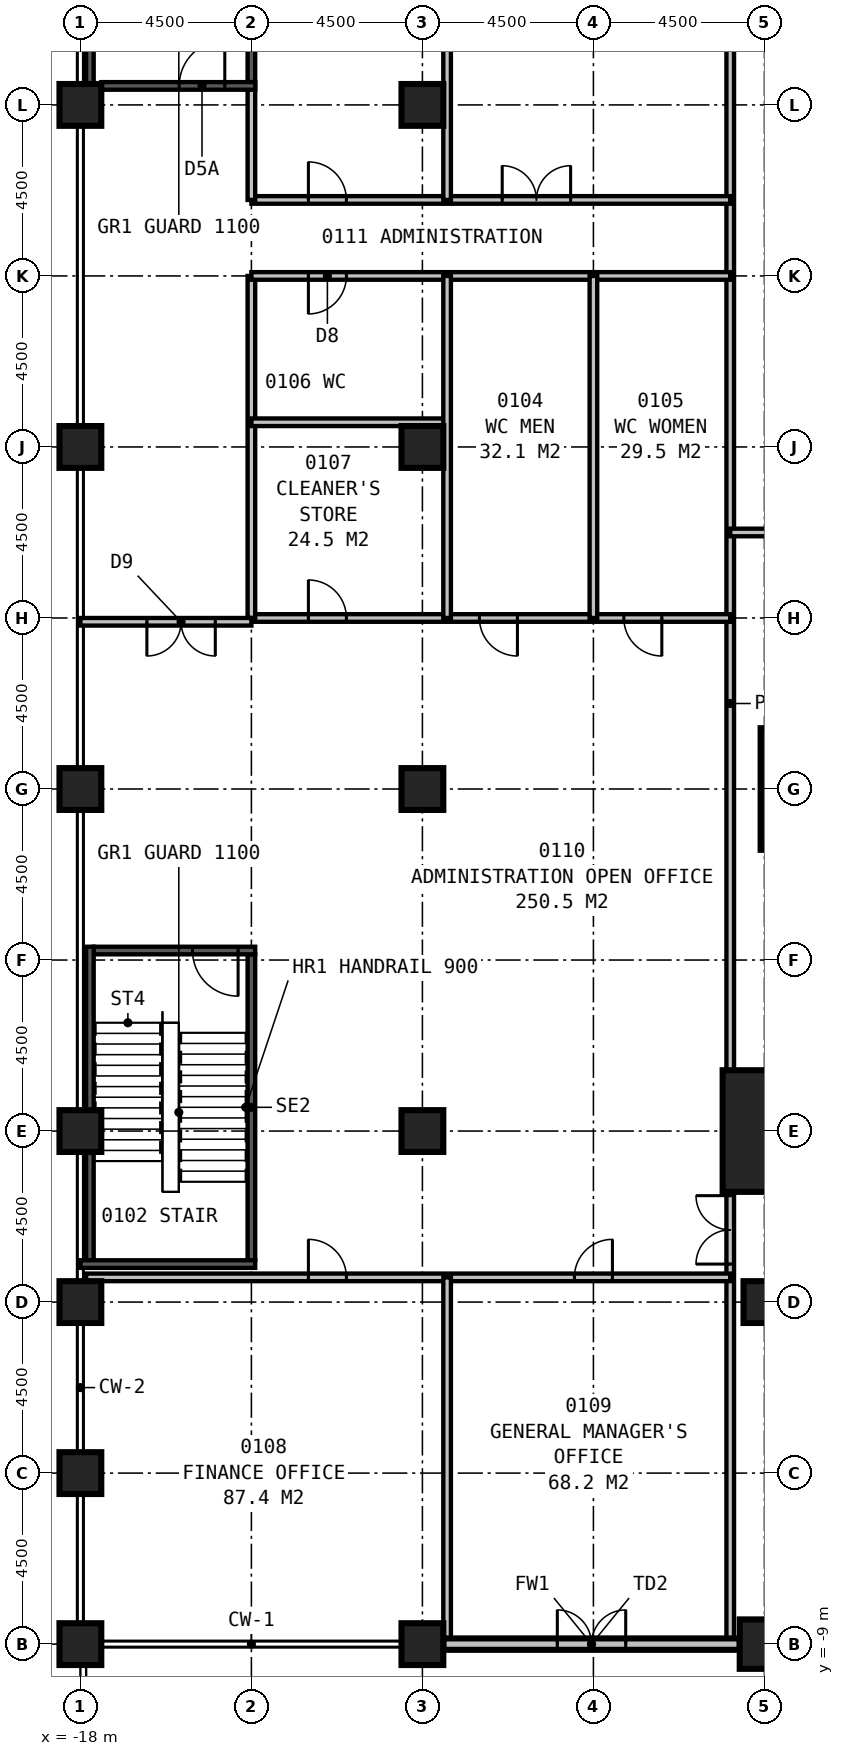
"""IFC4 building model, lengths in metres.
Left out: names, types, materials, properties, quantities, classifications, styles, units other than length and angle.
Written with IfcOpenShell. Run it as: python <this file> out.ifc"""

import sys

from ifc_helpers import new_model, si_unit, direction, frame, frame_2d, origin, origin_2d, place, context, subcontext, project, spatial, rectangle, extrude, element, fill, save


model = new_model("IFC4")
c1 = context("Model", 3, precision=1e-05, world=origin(), true_north=direction((0.0, 1.0)))
c2 = subcontext(c1, "Body", "Model", "MODEL_VIEW")
j1 = project(units=[si_unit("LENGTHUNIT", "METRE"), si_unit("PLANEANGLEUNIT", "RADIAN")], contexts=[c1])
p1 = place(None, origin())
s1 = spatial("IfcSite", under=j1, at=p1, CompositionType="ELEMENT")
p2 = place(p1, origin())
s2 = spatial("IfcBuilding", under=s1, at=p2, CompositionType="ELEMENT")
p3 = place(p2, frame((0.0, 0.0, 6.0)))
s3 = spatial("IfcBuildingStorey", under=s2, at=p3, CompositionType="ELEMENT", Elevation=6.0)
for number, where, z_axis, x_axis in (
    (1, (0.5, 4.5, 0.0), (0.0, 0.0, 1.0), (1.0, 0.0, 0.0)),
    (2, (1.5, 13.5, 0.0), (0.0, 0.0, 1.0), (1.0, 0.0, 0.0)),
):
    element("IfcColumn", number, at=place(p3, frame(where, z_axis=z_axis, x_axis=x_axis)), inside=s3, PredefinedType="COLUMN", context=c2, shape_type="SweptSolid", body=[
        extrude(rectangle(XDim=3.2, YDim=3.2, at=origin_2d()), origin(), (0.0, 0.0, 1.0), 5.0),
    ])
for number, where, z_axis, x_axis in (
    (3, (-18.0, -4.5, 0.0), (0.0, 0.0, 1.0), (1.0, 0.0, 0.0)),
    (4, (-18.0, 4.5, 0.0), (0.0, 0.0, 1.0), (1.0, 0.0, 0.0)),
    (5, (-9.0, 4.5, 0.0), (0.0, 0.0, 1.0), (1.0, 0.0, 0.0)),
    (6, (-18.0, 13.5, 0.0), (0.0, 0.0, 1.0), (1.0, 0.0, 0.0)),
    (7, (-9.0, 13.5, 0.0), (0.0, 0.0, 1.0), (1.0, 0.0, 0.0)),
    (8, (-18.0, 22.5, 0.0), (0.0, 0.0, 1.0), (1.0, 0.0, 0.0)),
    (9, (-9.0, 22.5, 0.0), (0.0, 0.0, 1.0), (1.0, 0.0, 0.0)),
    (10, (-18.0, 31.5, 0.0), (0.0, 0.0, 1.0), (1.0, 0.0, 0.0)),
    (11, (-9.0, 31.5, 0.0), (0.0, 0.0, 1.0), (1.0, 0.0, 0.0)),
    (12, (-18.0, 0.0, 0.0), (0.0, 0.0, 1.0), (1.0, 0.0, 0.0)),
):
    element("IfcColumn", number, at=place(p3, frame(where, z_axis=z_axis, x_axis=x_axis)), inside=s3, PredefinedType="COLUMN", context=c2, shape_type="SweptSolid", body=[
        extrude(rectangle(XDim=1.1, YDim=1.1, at=origin_2d()), origin(), (0.0, 0.0, 1.0), 5.0),
    ])
p4 = place(p3, frame((0.0, -9.0, 0.0), z_axis=(0.0, 0.0, 1.0), x_axis=(1.0, 0.0, 0.0)))
e13 = element("IfcColumn", 13, at=p4, inside=s3, PredefinedType="COLUMN", context=c2, shape_type="SweptSolid", body=[
    extrude(rectangle(XDim=1.3, YDim=1.3, at=origin_2d()), origin(), (0.0, 0.0, 1.0), 5.0),
])
for number, where, z_axis, x_axis in (
    (14, (-18.0, -9.0, 0.0), (0.0, 0.0, 1.0), (1.0, 0.0, 0.0)),
    (15, (-9.0, -9.0, 0.0), (0.0, 0.0, 1.0), (1.0, 0.0, 0.0)),
    (16, (0.0, 0.0, 0.0), (0.0, 0.0, 1.0), (1.0, 0.0, 0.0)),
):
    element("IfcColumn", number, at=place(p3, frame(where, z_axis=z_axis, x_axis=x_axis)), inside=s3, PredefinedType="COLUMN", context=c2, shape_type="SweptSolid", body=[
        extrude(rectangle(XDim=1.1, YDim=1.1, at=origin_2d()), origin(), (0.0, 0.0, 1.0), 5.0),
    ])
p5 = place(p3, frame((-8.45, -9.0, 0.0), z_axis=(0.0, 0.0, 1.0), x_axis=(1.0, 0.0, 0.0)))
e17 = element("IfcWall", 17, at=p5, inside=s3, PredefinedType="STANDARD", context=c2, shape_type="SweptSolid", body=[
    extrude(rectangle(XDim=7.8, YDim=0.3, at=frame_2d((3.9, 0.0))), origin(), (0.0, 0.0, 1.0), 3.1),
])
p6 = place(p5, frame((3.0, 0.0, 0.0)))
e18 = element("IfcOpeningElement", 18, at=p6, cuts=e17, PredefinedType="OPENING", context=c2, shape_type="SweptSolid", body=[
    extrude(rectangle(XDim=1.8, YDim=2.4, at=frame_2d((0.9, 1.2))), frame((0.0, 0.16, 0.0), z_axis=(0.0, -1.0, 0.0), x_axis=(1.0, 0.0, 0.0)), (0.0, 0.0, 1.0), 0.32),
])
p7 = place(p3, frame((-17.45, 32.0, 0.0), z_axis=(0.0, 0.0, 1.0), x_axis=(1.0, 0.0, 0.0)))
e19 = element("IfcWall", 19, at=p7, inside=s3, PredefinedType="SOLIDWALL", context=c2, shape_type="SweptSolid", body=[
    extrude(rectangle(XDim=4.05, YDim=0.2, at=frame_2d((2.025, 0.0))), origin(), (0.0, 0.0, 1.0), 3.1),
])
p8 = place(p7, frame((2.05, 0.0, 0.0)))
e20 = element("IfcOpeningElement", 20, at=p8, cuts=e19, PredefinedType="OPENING", context=c2, shape_type="SweptSolid", body=[
    extrude(rectangle(XDim=1.2, YDim=2.1, at=frame_2d((0.6, 1.05))), frame((0.0, 0.11, 0.0), z_axis=(0.0, -1.0, 0.0), x_axis=(1.0, 0.0, 0.0)), (0.0, 0.0, 1.0), 0.22),
])
p9 = place(p3, frame((-13.5, 32.1, 0.0), z_axis=(0.0, 0.0, 1.0), x_axis=(0.0, 1.0, 0.0)))
e21 = element("IfcWall", 21, at=p9, inside=s3, PredefinedType="SOLIDWALL", context=c2, shape_type="SweptSolid", body=[
    extrude(rectangle(XDim=8.4, YDim=0.2, at=frame_2d((4.2, 0.0))), origin(), (0.0, 0.0, 1.0), 4.7),
])
p10 = place(p3, frame((-17.65, 9.25, 0.0), z_axis=(0.0, 0.0, 1.0), x_axis=(1.0, 0.0, 0.0)))
e22 = element("IfcWall", 22, at=p10, inside=s3, PredefinedType="SOLIDWALL", context=c2, shape_type="SweptSolid", body=[
    extrude(rectangle(XDim=4.25, YDim=0.2, at=frame_2d((2.125, 0.0))), origin(), (0.0, 0.0, 1.0), 4.7),
])
p11 = place(p10, frame((3.8, 0.0, 0.0), z_axis=(0.0, 0.0, 1.0), x_axis=(-1.0, 0.0, 0.0)))
e23 = element("IfcOpeningElement", 23, at=p11, cuts=e22, PredefinedType="OPENING", context=c2, shape_type="SweptSolid", body=[
    extrude(rectangle(XDim=1.2, YDim=2.1, at=frame_2d((0.6, 1.05))), frame((0.0, 0.11, 0.0), z_axis=(0.0, -1.0, 0.0), x_axis=(1.0, 0.0, 0.0)), (0.0, 0.0, 1.0), 0.22),
])
p12 = place(p3, frame((-18.0, 1.0, 0.0), z_axis=(0.0, 0.0, 1.0), x_axis=(1.0, 0.0, 0.0)))
e24 = element("IfcWall", 24, at=p12, inside=s3, PredefinedType="SOLIDWALL", context=c2, shape_type="SweptSolid", body=[
    extrude(rectangle(XDim=4.6, YDim=0.2, at=frame_2d((2.3, 0.0))), origin(), (0.0, 0.0, 1.0), 4.7),
])
p13 = place(p3, frame((-13.5, 1.1, 0.0), z_axis=(0.0, 0.0, 1.0), x_axis=(0.0, 1.0, 0.0)))
e25 = element("IfcWall", 25, at=p13, inside=s3, PredefinedType="SOLIDWALL", context=c2, shape_type="SweptSolid", body=[
    extrude(rectangle(XDim=8.05, YDim=0.2, at=frame_2d((4.025, 0.0))), origin(), (0.0, 0.0, 1.0), 4.7),
])
p14 = place(p3, frame((-17.75, 32.05, 0.0), z_axis=(0.0, 0.0, 1.0), x_axis=(0.0, 1.0, 0.0)))
e26 = element("IfcWall", 26, at=p14, inside=s3, PredefinedType="SOLIDWALL", context=c2, shape_type="SweptSolid", body=[
    extrude(rectangle(XDim=7.9, YDim=0.2, at=frame_2d((3.95, 0.0))), origin(), (0.0, 0.0, 1.0), 4.7),
])
p15 = place(p3, frame((-17.75, 1.1, 0.0), z_axis=(0.0, 0.0, 1.0), x_axis=(0.0, 1.0, 0.0)))
e27 = element("IfcWall", 27, at=p15, inside=s3, PredefinedType="SOLIDWALL", context=c2, shape_type="SweptSolid", body=[
    extrude(rectangle(XDim=2.85, YDim=0.2, at=frame_2d((1.425, 0.0))), origin(), (0.0, 0.0, 1.0), 4.7),
])
p16 = place(p3, frame((-17.75, 5.05, 0.0), z_axis=(0.0, 0.0, 1.0), x_axis=(0.0, 1.0, 0.0)))
e28 = element("IfcWall", 28, at=p16, inside=s3, PredefinedType="SOLIDWALL", context=c2, shape_type="SweptSolid", body=[
    extrude(rectangle(XDim=4.3, YDim=0.2, at=frame_2d((2.15, 0.0))), origin(), (0.0, 0.0, 1.0), 4.7),
])
p17 = place(p3, frame((-0.9, -9.0, 0.0), z_axis=(0.0, 0.0, 1.0), x_axis=(0.0, 1.0, 0.0)))
e29 = element("IfcWall", 29, at=p17, inside=s3, PredefinedType="PARTITIONING", context=c2, shape_type="SweptSolid", body=[
    extrude(rectangle(XDim=49.5, YDim=0.2, at=frame_2d((24.75, 0.0))), origin(), (0.0, 0.0, 1.0), 4.7),
])
p18 = place(p17, frame((10.0, 0.0, 0.0)))
e30 = element("IfcOpeningElement", 30, at=p18, cuts=e29, PredefinedType="OPENING", context=c2, shape_type="SweptSolid", body=[
    extrude(rectangle(XDim=1.8, YDim=2.4, at=frame_2d((0.9, 1.2))), frame((0.0, 0.11, 0.0), z_axis=(0.0, -1.0, 0.0), x_axis=(1.0, 0.0, 0.0)), (0.0, 0.0, 1.0), 0.22),
])
p19 = place(p3, frame((-13.5, 18.0, 0.0), z_axis=(0.0, 0.0, 1.0), x_axis=(1.0, 0.0, 0.0)))
e31 = element("IfcWall", 31, at=p19, inside=s3, PredefinedType="PARTITIONING", context=c2, shape_type="SweptSolid", body=[
    extrude(rectangle(XDim=12.6, YDim=0.2, at=frame_2d((6.3, 0.0))), origin(), (0.0, 0.0, 1.0), 4.7),
])
p20 = place(p19, frame((7.0, 0.0, 0.0), z_axis=(0.0, 0.0, 1.0), x_axis=(-1.0, 0.0, 0.0)))
e32 = element("IfcOpeningElement", 32, at=p20, cuts=e31, PredefinedType="OPENING", context=c2, shape_type="SweptSolid", body=[
    extrude(rectangle(XDim=1.0, YDim=2.1, at=frame_2d((0.5, 1.05))), frame((0.0, 0.11, 0.0), z_axis=(0.0, -1.0, 0.0), x_axis=(1.0, 0.0, 0.0)), (0.0, 0.0, 1.0), 0.22),
])
p21 = place(p19, frame((10.8, 0.0, 0.0), z_axis=(0.0, 0.0, 1.0), x_axis=(-1.0, 0.0, 0.0)))
e33 = element("IfcOpeningElement", 33, at=p21, cuts=e31, PredefinedType="OPENING", context=c2, shape_type="SweptSolid", body=[
    extrude(rectangle(XDim=1.0, YDim=2.1, at=frame_2d((0.5, 1.05))), frame((0.0, 0.11, 0.0), z_axis=(0.0, -1.0, 0.0), x_axis=(1.0, 0.0, 0.0)), (0.0, 0.0, 1.0), 0.22),
])
p22 = place(p19, frame((1.5, 0.0, 0.0)))
e34 = element("IfcOpeningElement", 34, at=p22, cuts=e31, PredefinedType="OPENING", context=c2, shape_type="SweptSolid", body=[
    extrude(rectangle(XDim=1.0, YDim=2.1, at=frame_2d((0.5, 1.05))), frame((0.0, 0.11, 0.0), z_axis=(0.0, -1.0, 0.0), x_axis=(1.0, 0.0, 0.0)), (0.0, 0.0, 1.0), 0.22),
])
p23 = place(p3, frame((-13.5, 18.0, 0.0), z_axis=(0.0, 0.0, 1.0), x_axis=(0.0, 1.0, 0.0)))
e35 = element("IfcWall", 35, at=p23, inside=s3, PredefinedType="PARTITIONING", context=c2, shape_type="SweptSolid", body=[
    extrude(rectangle(XDim=9.0, YDim=0.2, at=frame_2d((4.5, 0.0))), origin(), (0.0, 0.0, 1.0), 4.7),
])
p24 = place(p3, frame((-13.5, 27.0, 0.0), z_axis=(0.0, 0.0, 1.0), x_axis=(1.0, 0.0, 0.0)))
e36 = element("IfcWall", 36, at=p24, inside=s3, PredefinedType="PARTITIONING", context=c2, shape_type="SweptSolid", body=[
    extrude(rectangle(XDim=12.6, YDim=0.2, at=frame_2d((6.3, 0.0))), origin(), (0.0, 0.0, 1.0), 4.7),
])
p25 = place(p24, frame((2.5, 0.0, 0.0), z_axis=(0.0, 0.0, 1.0), x_axis=(-1.0, 0.0, 0.0)))
e37 = element("IfcOpeningElement", 37, at=p25, cuts=e36, PredefinedType="OPENING", context=c2, shape_type="SweptSolid", body=[
    extrude(rectangle(XDim=1.0, YDim=2.1, at=frame_2d((0.5, 1.05))), frame((0.0, 0.11, 0.0), z_axis=(0.0, -1.0, 0.0), x_axis=(1.0, 0.0, 0.0)), (0.0, 0.0, 1.0), 0.22),
])
p26 = place(p3, frame((-4.5, 18.0, 0.0), z_axis=(0.0, 0.0, 1.0), x_axis=(0.0, 1.0, 0.0)))
e38 = element("IfcWall", 38, at=p26, inside=s3, PredefinedType="PARTITIONING", context=c2, shape_type="SweptSolid", body=[
    extrude(rectangle(XDim=9.0, YDim=0.2, at=frame_2d((4.5, 0.0))), origin(), (0.0, 0.0, 1.0), 4.7),
])
p27 = place(p3, frame((-13.5, 23.15, 0.0), z_axis=(0.0, 0.0, 1.0), x_axis=(1.0, 0.0, 0.0)))
e39 = element("IfcWall", 39, at=p27, inside=s3, PredefinedType="PARTITIONING", context=c2, shape_type="SweptSolid", body=[
    extrude(rectangle(XDim=5.15, YDim=0.2, at=frame_2d((2.575, 0.0))), origin(), (0.0, 0.0, 1.0), 4.7),
])
p28 = place(p3, frame((-8.35, 18.0, 0.0), z_axis=(0.0, 0.0, 1.0), x_axis=(0.0, 1.0, 0.0)))
e40 = element("IfcWall", 40, at=p28, inside=s3, PredefinedType="PARTITIONING", context=c2, shape_type="SweptSolid", body=[
    extrude(rectangle(XDim=9.0, YDim=0.2, at=frame_2d((4.5, 0.0))), origin(), (0.0, 0.0, 1.0), 4.7),
])
p29 = place(p3, frame((-17.85, 0.65, 0.0), z_axis=(0.0, 0.0, 1.0), x_axis=(1.0, 0.0, 0.0)))
e41 = element("IfcWall", 41, at=p29, inside=s3, PredefinedType="PARTITIONING", context=c2, shape_type="SweptSolid", body=[
    extrude(rectangle(XDim=16.95, YDim=0.2, at=frame_2d((8.475, 0.0))), origin(), (0.0, 0.0, 1.0), 4.7),
])
p30 = place(p29, frame((5.85, 0.0, 0.0)))
e42 = element("IfcOpeningElement", 42, at=p30, cuts=e41, PredefinedType="OPENING", context=c2, shape_type="SweptSolid", body=[
    extrude(rectangle(XDim=1.0, YDim=2.1, at=frame_2d((0.5, 1.05))), frame((0.0, 0.11, 0.0), z_axis=(0.0, -1.0, 0.0), x_axis=(1.0, 0.0, 0.0)), (0.0, 0.0, 1.0), 0.22),
])
p31 = place(p29, frame((12.85, 0.0, 0.0)))
e43 = element("IfcOpeningElement", 43, at=p31, cuts=e41, PredefinedType="OPENING", context=c2, shape_type="SweptSolid", body=[
    extrude(rectangle(XDim=1.0, YDim=2.1, at=frame_2d((0.5, 1.05))), frame((0.0, 0.11, 0.0), z_axis=(0.0, -1.0, 0.0), x_axis=(1.0, 0.0, 0.0)), (0.0, 0.0, 1.0), 0.22),
])
p32 = place(p3, frame((-8.35, -8.85, 0.0), z_axis=(0.0, 0.0, 1.0), x_axis=(0.0, 1.0, 0.0)))
e44 = element("IfcWall", 44, at=p32, inside=s3, PredefinedType="PARTITIONING", context=c2, shape_type="SweptSolid", body=[
    extrude(rectangle(XDim=9.5, YDim=0.2, at=frame_2d((4.75, 0.0))), origin(), (0.0, 0.0, 1.0), 2.8),
])
p33 = place(p3, frame((-18.0, 17.9, 0.0), z_axis=(0.0, 0.0, 1.0), x_axis=(1.0, 0.0, 0.0)))
e45 = element("IfcWall", 45, at=p33, inside=s3, PredefinedType="PARTITIONING", context=c2, shape_type="SweptSolid", body=[
    extrude(rectangle(XDim=4.5, YDim=0.2, at=frame_2d((2.25, 0.0))), origin(), (0.0, 0.0, 1.0), 4.7),
])
p34 = place(p33, frame((3.55, 0.0, 0.0), z_axis=(0.0, 0.0, 1.0), x_axis=(-1.0, 0.0, 0.0)))
e46 = element("IfcOpeningElement", 46, at=p34, cuts=e45, PredefinedType="OPENING", context=c2, shape_type="SweptSolid", body=[
    extrude(rectangle(XDim=1.8, YDim=2.4, at=frame_2d((0.9, 1.2))), frame((0.0, 0.11, 0.0), z_axis=(0.0, -1.0, 0.0), x_axis=(1.0, 0.0, 0.0)), (0.0, 0.0, 1.0), 0.22),
])
p35 = place(p3, frame((-13.5, 29.0, 0.0), z_axis=(0.0, 0.0, 1.0), x_axis=(1.0, 0.0, 0.0)))
e47 = element("IfcWall", 47, at=p35, inside=s3, PredefinedType="PARTITIONING", context=c2, shape_type="SweptSolid", body=[
    extrude(rectangle(XDim=12.6, YDim=0.2, at=frame_2d((6.3, 0.0))), origin(), (0.0, 0.0, 1.0), 4.7),
])
p36 = place(p35, frame((1.5, 0.0, 0.0)))
e48 = element("IfcOpeningElement", 48, at=p36, cuts=e47, PredefinedType="OPENING", context=c2, shape_type="SweptSolid", body=[
    extrude(rectangle(XDim=1.0, YDim=2.1, at=frame_2d((0.5, 1.05))), frame((0.0, 0.11, 0.0), z_axis=(0.0, -1.0, 0.0), x_axis=(1.0, 0.0, 0.0)), (0.0, 0.0, 1.0), 0.22),
])
p37 = place(p35, frame((6.6, 0.0, 0.0)))
e49 = element("IfcOpeningElement", 49, at=p37, cuts=e47, PredefinedType="OPENING", context=c2, shape_type="SweptSolid", body=[
    extrude(rectangle(XDim=1.8, YDim=2.4, at=frame_2d((0.9, 1.2))), frame((0.0, 0.11, 0.0), z_axis=(0.0, -1.0, 0.0), x_axis=(1.0, 0.0, 0.0)), (0.0, 0.0, 1.0), 0.22),
])
p38 = place(p3, frame((-13.5, 29.0, 0.0), z_axis=(0.0, 0.0, 1.0), x_axis=(0.0, 1.0, 0.0)))
e50 = element("IfcWall", 50, at=p38, inside=s3, PredefinedType="PARTITIONING", context=c2, shape_type="SweptSolid", body=[
    extrude(rectangle(XDim=3.0, YDim=0.2, at=frame_2d((1.5, 0.0))), origin(), (0.0, 0.0, 1.0), 4.7),
])
p39 = place(p3, frame((-8.35, 29.0, 0.0), z_axis=(0.0, 0.0, 1.0), x_axis=(0.0, 1.0, 0.0)))
e51 = element("IfcWall", 51, at=p39, inside=s3, PredefinedType="PARTITIONING", context=c2, shape_type="SweptSolid", body=[
    extrude(rectangle(XDim=11.35, YDim=0.2, at=frame_2d((5.675, 0.0))), origin(), (0.0, 0.0, 1.0), 4.7),
])
p40 = place(p3, frame((-0.9, 20.25, 0.0), z_axis=(0.0, 0.0, 1.0), x_axis=(1.0, 0.0, 0.0)))
e52 = element("IfcWall", 52, at=p40, inside=s3, PredefinedType="PARTITIONING", context=c2, shape_type="SweptSolid", body=[
    extrude(rectangle(XDim=14.1, YDim=0.2, at=frame_2d((7.05, 0.0))), origin(), (0.0, 0.0, 1.0), 4.7),
])
p41 = place(p40, frame((5.0, 0.0, 0.0)))
e53 = element("IfcOpeningElement", 53, at=p41, cuts=e52, PredefinedType="OPENING", context=c2, shape_type="SweptSolid", body=[
    extrude(rectangle(XDim=1.8, YDim=2.4, at=frame_2d((0.9, 1.2))), frame((0.0, 0.11, 0.0), z_axis=(0.0, -1.0, 0.0), x_axis=(1.0, 0.0, 0.0)), (0.0, 0.0, 1.0), 0.22),
])
p42 = place(p6, origin())
e54 = element("IfcDoor", 54, at=p42, inside=s3, OperationType="DOUBLE_DOOR_SINGLE_SWING", PredefinedType="DOOR", context=c2, shape_type="SweptSolid", body=[
    extrude(rectangle(XDim=1.8, YDim=2.4, at=frame_2d((0.9, 1.2))), frame((0.0, 0.025, 0.0), z_axis=(0.0, -1.0, 0.0), x_axis=(1.0, 0.0, 0.0)), (0.0, 0.0, 1.0), 0.05),
])
fill(e18, e54)
p43 = place(p8, origin())
e55 = element("IfcDoor", 55, at=p43, inside=s3, OperationType="SINGLE_SWING_RIGHT", PredefinedType="DOOR", context=c2, shape_type="SweptSolid", body=[
    extrude(rectangle(XDim=1.2, YDim=2.1, at=frame_2d((0.6, 1.05))), frame((0.0, 0.025, 0.0), z_axis=(0.0, -1.0, 0.0), x_axis=(1.0, 0.0, 0.0)), (0.0, 0.0, 1.0), 0.05),
])
fill(e20, e55)
p44 = place(p11, origin())
e56 = element("IfcDoor", 56, at=p44, inside=s3, OperationType="SINGLE_SWING_LEFT", PredefinedType="DOOR", context=c2, shape_type="SweptSolid", body=[
    extrude(rectangle(XDim=1.2, YDim=2.1, at=frame_2d((0.6, 1.05))), frame((0.0, 0.025, 0.0), z_axis=(0.0, -1.0, 0.0), x_axis=(1.0, 0.0, 0.0)), (0.0, 0.0, 1.0), 0.05),
])
fill(e23, e56)
p45 = place(p18, origin())
e57 = element("IfcDoor", 57, at=p45, inside=s3, OperationType="DOUBLE_DOOR_SINGLE_SWING", PredefinedType="DOOR", context=c2, shape_type="SweptSolid", body=[
    extrude(rectangle(XDim=1.8, YDim=2.4, at=frame_2d((0.9, 1.2))), frame((0.0, 0.025, 0.0), z_axis=(0.0, -1.0, 0.0), x_axis=(1.0, 0.0, 0.0)), (0.0, 0.0, 1.0), 0.05),
])
fill(e30, e57)
p46 = place(p20, origin())
e58 = element("IfcDoor", 58, at=p46, inside=s3, OperationType="SINGLE_SWING_LEFT", PredefinedType="DOOR", context=c2, shape_type="SweptSolid", body=[
    extrude(rectangle(XDim=1.0, YDim=2.1, at=frame_2d((0.5, 1.05))), frame((0.0, 0.025, 0.0), z_axis=(0.0, -1.0, 0.0), x_axis=(1.0, 0.0, 0.0)), (0.0, 0.0, 1.0), 0.05),
])
fill(e32, e58)
p47 = place(p21, origin())
e59 = element("IfcDoor", 59, at=p47, inside=s3, OperationType="SINGLE_SWING_LEFT", PredefinedType="DOOR", context=c2, shape_type="SweptSolid", body=[
    extrude(rectangle(XDim=1.0, YDim=2.1, at=frame_2d((0.5, 1.05))), frame((0.0, 0.025, 0.0), z_axis=(0.0, -1.0, 0.0), x_axis=(1.0, 0.0, 0.0)), (0.0, 0.0, 1.0), 0.05),
])
fill(e33, e59)
p48 = place(p22, origin())
e60 = element("IfcDoor", 60, at=p48, inside=s3, OperationType="SINGLE_SWING_LEFT", PredefinedType="DOOR", context=c2, shape_type="SweptSolid", body=[
    extrude(rectangle(XDim=1.0, YDim=2.1, at=frame_2d((0.5, 1.05))), frame((0.0, 0.025, 0.0), z_axis=(0.0, -1.0, 0.0), x_axis=(1.0, 0.0, 0.0)), (0.0, 0.0, 1.0), 0.05),
])
fill(e34, e60)
p49 = place(p25, origin())
e61 = element("IfcDoor", 61, at=p49, inside=s3, OperationType="SINGLE_SWING_RIGHT", PredefinedType="DOOR", context=c2, shape_type="SweptSolid", body=[
    extrude(rectangle(XDim=1.0, YDim=2.1, at=frame_2d((0.5, 1.05))), frame((0.0, 0.025, 0.0), z_axis=(0.0, -1.0, 0.0), x_axis=(1.0, 0.0, 0.0)), (0.0, 0.0, 1.0), 0.05),
])
fill(e37, e61)
p50 = place(p30, origin())
e62 = element("IfcDoor", 62, at=p50, inside=s3, OperationType="SINGLE_SWING_LEFT", PredefinedType="DOOR", context=c2, shape_type="SweptSolid", body=[
    extrude(rectangle(XDim=1.0, YDim=2.1, at=frame_2d((0.5, 1.05))), frame((0.0, 0.025, 0.0), z_axis=(0.0, -1.0, 0.0), x_axis=(1.0, 0.0, 0.0)), (0.0, 0.0, 1.0), 0.05),
])
fill(e42, e62)
p51 = place(p31, origin())
e63 = element("IfcDoor", 63, at=p51, inside=s3, OperationType="SINGLE_SWING_RIGHT", PredefinedType="DOOR", context=c2, shape_type="SweptSolid", body=[
    extrude(rectangle(XDim=1.0, YDim=2.1, at=frame_2d((0.5, 1.05))), frame((0.0, 0.025, 0.0), z_axis=(0.0, -1.0, 0.0), x_axis=(1.0, 0.0, 0.0)), (0.0, 0.0, 1.0), 0.05),
])
fill(e43, e63)
p52 = place(p34, origin())
e64 = element("IfcDoor", 64, at=p52, inside=s3, OperationType="DOUBLE_DOOR_SINGLE_SWING", PredefinedType="DOOR", context=c2, shape_type="SweptSolid", body=[
    extrude(rectangle(XDim=1.8, YDim=2.4, at=frame_2d((0.9, 1.2))), frame((0.0, 0.025, 0.0), z_axis=(0.0, -1.0, 0.0), x_axis=(1.0, 0.0, 0.0)), (0.0, 0.0, 1.0), 0.05),
])
fill(e46, e64)
p53 = place(p36, origin())
e65 = element("IfcDoor", 65, at=p53, inside=s3, OperationType="SINGLE_SWING_LEFT", PredefinedType="DOOR", context=c2, shape_type="SweptSolid", body=[
    extrude(rectangle(XDim=1.0, YDim=2.1, at=frame_2d((0.5, 1.05))), frame((0.0, 0.025, 0.0), z_axis=(0.0, -1.0, 0.0), x_axis=(1.0, 0.0, 0.0)), (0.0, 0.0, 1.0), 0.05),
])
fill(e48, e65)
p54 = place(p37, origin())
e66 = element("IfcDoor", 66, at=p54, inside=s3, OperationType="DOUBLE_DOOR_SINGLE_SWING", PredefinedType="DOOR", context=c2, shape_type="SweptSolid", body=[
    extrude(rectangle(XDim=1.8, YDim=2.4, at=frame_2d((0.9, 1.2))), frame((0.0, 0.025, 0.0), z_axis=(0.0, -1.0, 0.0), x_axis=(1.0, 0.0, 0.0)), (0.0, 0.0, 1.0), 0.05),
])
fill(e49, e66)
save(model, sys.argv[1])
